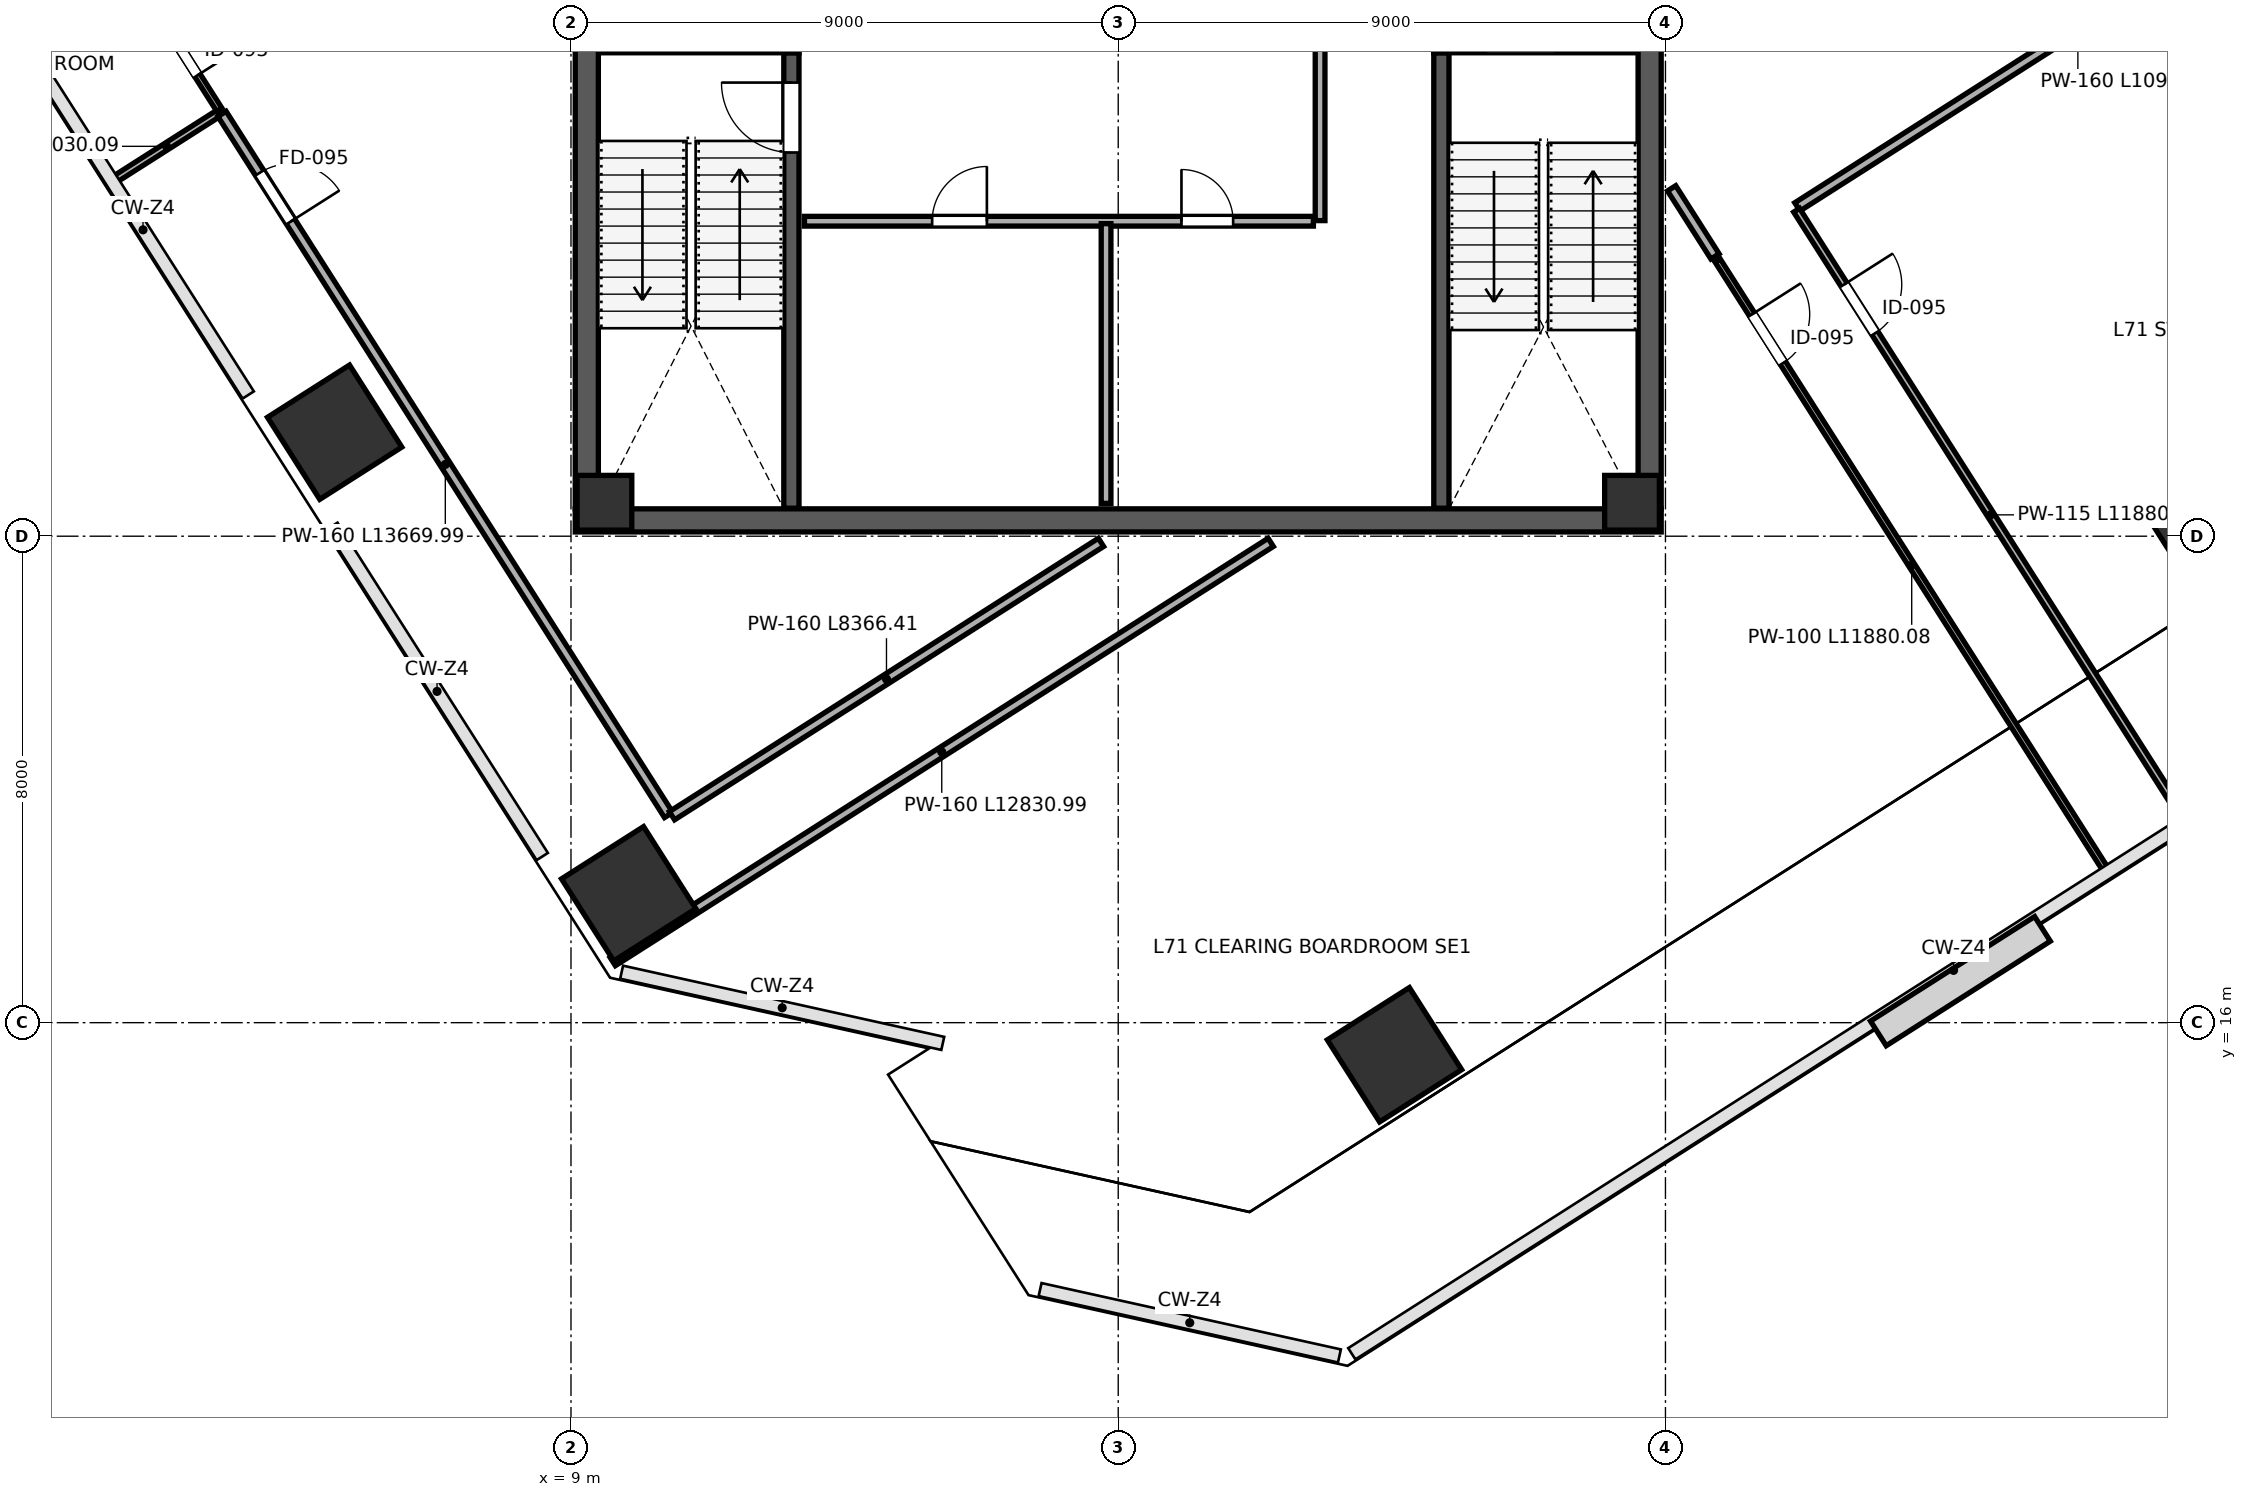
"""IFC4 building model, lengths in metres.
Left out: names, types, materials, properties, quantities, classifications, styles, units other than length and angle.
Written with IfcOpenShell. Run it as: python <this file> out.ifc"""

import sys

from ifc_helpers import new_model, si_unit, direction, frame, frame_2d, origin, origin_2d, place, context, subcontext, project, spatial, rectangle, extrude, source, transform, mapped, element, fill, save


model = new_model("IFC4")
c1 = context("Model", 3, precision=1e-05, world=origin(), true_north=direction((0.0, 1.0)))
c2 = subcontext(c1, "Body", "Model", "MODEL_VIEW")
j1 = project(units=[si_unit("LENGTHUNIT", "METRE"), si_unit("PLANEANGLEUNIT", "RADIAN")], contexts=[c1])
p1 = place(None, origin())
s1 = spatial("IfcSite", under=j1, at=p1, CompositionType="ELEMENT")
p2 = place(p1, origin())
s2 = spatial("IfcBuilding", under=s1, at=p2, CompositionType="ELEMENT")
p3 = place(p2, frame((0.0, 0.0, 315.6)))
s3 = spatial("IfcBuildingStorey", under=s2, at=p3, CompositionType="ELEMENT", Elevation=315.6)
m1 = source(origin(), c2, "Body", "SweptSolid", [
    extrude(rectangle(XDim=0.9, YDim=0.9, at=origin_2d()), origin(), (0.0, 0.0, 1.0), 4.198),
])
for number, where, z_axis, x_axis in (
    (1, (9.55, 24.55, 0.001), (0.0, 0.0, 1.0), (1.0, 0.0, 0.0)),
    (2, (26.45, 24.55, 0.001), (0.0, 0.0, 1.0), (1.0, 0.0, 0.0)),
):
    element("IfcColumn", number, at=place(p3, frame(where, z_axis=z_axis, x_axis=x_axis)), inside=s3, PredefinedType="COLUMN", context=c2, shape_type="MappedRepresentation", body=[
        mapped(m1, transform((0.0, 0.0, 0.0), scale=1.0)),
    ])
m2 = source(origin(), c2, "Body", "SweptSolid", [
    extrude(rectangle(XDim=1.6, YDim=1.6, at=origin_2d()), origin(), (0.0, 0.0, 1.0), 4.198),
])
for number, where, z_axis, x_axis in (
    (3, (5.113, 25.71, 0.001), (0.0, 0.0, 1.0), (-0.537, 0.843, 0.0)),
    (4, (9.949, 18.12, 0.001), (0.0, 0.0, 1.0), (-0.537, 0.843, 0.0)),
    (5, (22.544, 15.472, 0.001), (0.0, 0.0, 1.0), (-0.537, 0.843, 0.0)),
    (6, (36.038, 24.069, 0.001), (0.0, 0.0, 1.0), (-0.537, 0.843, 0.0)),
):
    element("IfcColumn", number, at=place(p3, frame(where, z_axis=z_axis, x_axis=x_axis)), inside=s3, PredefinedType="COLUMN", context=c2, shape_type="MappedRepresentation", body=[
        mapped(m2, transform((0.0, 0.0, 0.0), scale=1.0)),
    ])
p4 = place(p3, frame((9.26, 24.45, 0.0), z_axis=(0.0, 0.0, 1.0), x_axis=(0.0, 1.0, 0.0)))
e7 = element("IfcWall", 7, at=p4, inside=s3, PredefinedType="SHEAR", context=c2, shape_type="SweptSolid", body=[
    extrude(rectangle(XDim=15.1, YDim=0.38, at=frame_2d((7.55, 0.0))), origin(), (0.0, 0.0, 1.0), 3.96),
])
p5 = place(p4, frame((8.7, 0.0, 0.0)))
e8 = element("IfcOpeningElement", 8, at=p5, cuts=e7, PredefinedType="OPENING", context=c2, shape_type="SweptSolid", body=[
    extrude(rectangle(XDim=1.15, YDim=2.2, at=frame_2d((0.575, 1.1))), frame((0.0, 0.2, 0.0), z_axis=(0.0, -1.0, 0.0), x_axis=(1.0, 0.0, 0.0)), (0.0, 0.0, 1.0), 0.4),
])
p6 = place(p3, frame((26.74, 24.45, 0.0), z_axis=(0.0, 0.0, 1.0), x_axis=(0.0, 1.0, 0.0)))
e9 = element("IfcWall", 9, at=p6, inside=s3, PredefinedType="SHEAR", context=c2, shape_type="SweptSolid", body=[
    extrude(rectangle(XDim=15.1, YDim=0.38, at=frame_2d((7.55, 0.0))), origin(), (0.0, 0.0, 1.0), 3.96),
])
p7 = place(p6, frame((8.6, 0.0, 0.0)))
e10 = element("IfcOpeningElement", 10, at=p7, cuts=e9, PredefinedType="OPENING", context=c2, shape_type="SweptSolid", body=[
    extrude(rectangle(XDim=1.15, YDim=2.2, at=frame_2d((0.575, 1.1))), frame((0.0, 0.2, 0.0), z_axis=(0.0, -1.0, 0.0), x_axis=(1.0, 0.0, 0.0)), (0.0, 0.0, 1.0), 0.4),
])
p8 = place(p3, frame((9.07, 24.26, 0.0), z_axis=(0.0, 0.0, 1.0), x_axis=(1.0, 0.0, 0.0)))
e11 = element("IfcWall", 11, at=p8, inside=s3, PredefinedType="SHEAR", context=c2, shape_type="SweptSolid", body=[
    extrude(rectangle(XDim=17.86, YDim=0.38, at=frame_2d((8.93, 0.0))), origin(), (0.0, 0.0, 1.0), 3.96),
])
p9 = place(p3, frame((12.625, 24.46, 0.0), z_axis=(0.0, 0.0, 1.0), x_axis=(0.0, 1.0, 0.0)))
e12 = element("IfcWall", 12, at=p9, inside=s3, PredefinedType="SHEAR", context=c2, shape_type="SweptSolid", body=[
    extrude(rectangle(XDim=7.49, YDim=0.25, at=frame_2d((3.745, 0.0))), origin(), (0.0, 0.0, 1.0), 3.96),
])
p10 = place(p9, frame((5.85, 0.0, 0.0)))
e13 = element("IfcOpeningElement", 13, at=p10, cuts=e12, PredefinedType="OPENING", context=c2, shape_type="SweptSolid", body=[
    extrude(rectangle(XDim=1.15, YDim=2.2, at=frame_2d((0.575, 1.1))), frame((0.0, 0.135, 0.0), z_axis=(0.0, -1.0, 0.0), x_axis=(1.0, 0.0, 0.0)), (0.0, 0.0, 1.0), 0.27),
])
p11 = place(p3, frame((9.46, 32.075, 0.0), z_axis=(0.0, 0.0, 1.0), x_axis=(1.0, 0.0, 0.0)))
e14 = element("IfcWall", 14, at=p11, inside=s3, PredefinedType="SHEAR", context=c2, shape_type="SweptSolid", body=[
    extrude(rectangle(XDim=3.29, YDim=0.25, at=frame_2d((1.645, 0.0))), origin(), (0.0, 0.0, 1.0), 3.96),
])
p12 = place(p3, frame((23.315, 24.46, 0.0), z_axis=(0.0, 0.0, 1.0), x_axis=(0.0, 1.0, 0.0)))
e15 = element("IfcWall", 15, at=p12, inside=s3, PredefinedType="SHEAR", context=c2, shape_type="SweptSolid", body=[
    extrude(rectangle(XDim=7.49, YDim=0.25, at=frame_2d((3.745, 0.0))), origin(), (0.0, 0.0, 1.0), 3.96),
])
p13 = place(p3, frame((23.19, 32.075, 0.0), z_axis=(0.0, 0.0, 1.0), x_axis=(1.0, 0.0, 0.0)))
e16 = element("IfcWall", 16, at=p13, inside=s3, PredefinedType="SHEAR", context=c2, shape_type="SweptSolid", body=[
    extrude(rectangle(XDim=3.35, YDim=0.25, at=frame_2d((1.675, 0.0))), origin(), (0.0, 0.0, 1.0), 3.96),
])
p14 = place(p13, frame((0.85, 0.0, 0.0)))
e17 = element("IfcOpeningElement", 17, at=p14, cuts=e16, PredefinedType="OPENING", context=c2, shape_type="SweptSolid", body=[
    extrude(rectangle(XDim=1.15, YDim=2.2, at=frame_2d((0.575, 1.1))), frame((0.0, 0.135, 0.0), z_axis=(0.0, -1.0, 0.0), x_axis=(1.0, 0.0, 0.0)), (0.0, 0.0, 1.0), 0.27),
])
p15 = place(p3, frame((12.84, 29.18, 0.0), z_axis=(0.0, 0.0, 1.0), x_axis=(1.0, 0.0, 0.0)))
e18 = element("IfcWall", 18, at=p15, inside=s3, PredefinedType="PARTITIONING", context=c2, shape_type="SweptSolid", body=[
    extrude(rectangle(XDim=8.37, YDim=0.16, at=frame_2d((4.185, 0.0))), origin(), (0.0, 0.0, 1.0), 3.96),
])
p16 = place(p15, frame((2.1, 0.0, 0.0)))
e19 = element("IfcOpeningElement", 19, at=p16, cuts=e18, PredefinedType="OPENING", context=c2, shape_type="SweptSolid", body=[
    extrude(rectangle(XDim=0.9, YDim=2.15, at=frame_2d((0.45, 1.075))), frame((0.0, 0.09, 0.0), z_axis=(0.0, -1.0, 0.0), x_axis=(1.0, 0.0, 0.0)), (0.0, 0.0, 1.0), 0.18),
])
p17 = place(p15, frame((6.2, 0.0, 0.0)))
e20 = element("IfcOpeningElement", 20, at=p17, cuts=e18, PredefinedType="OPENING", context=c2, shape_type="SweptSolid", body=[
    extrude(rectangle(XDim=0.85, YDim=2.1, at=frame_2d((0.425, 1.05))), frame((0.0, 0.09, 0.0), z_axis=(0.0, -1.0, 0.0), x_axis=(1.0, 0.0, 0.0)), (0.0, 0.0, 1.0), 0.18),
])
p18 = place(p3, frame((17.8, 24.54, 0.0), z_axis=(0.0, 0.0, 1.0), x_axis=(0.0, 1.0, 0.0)))
e21 = element("IfcWall", 21, at=p18, inside=s3, PredefinedType="PARTITIONING", context=c2, shape_type="SweptSolid", body=[
    extrude(rectangle(XDim=4.6, YDim=0.16, at=frame_2d((2.3, 0.0))), origin(), (0.0, 0.0, 1.0), 3.96),
])
p19 = place(p3, frame((21.32, 29.19, 0.0), z_axis=(0.0, 0.0, 1.0), x_axis=(0.0, 1.0, 0.0)))
e22 = element("IfcWall", 22, at=p19, inside=s3, PredefinedType="PARTITIONING", context=c2, shape_type="SweptSolid", body=[
    extrude(rectangle(XDim=2.92, YDim=0.16, at=frame_2d((1.46, 0.0))), origin(), (0.0, 0.0, 1.0), 3.96),
])
p20 = place(p3, frame((1.493, 29.866, 0.0), z_axis=(0.0, 0.0, 1.0), x_axis=(0.843433611632, 0.537233415537, 0.0)))
e23 = element("IfcWall", 23, at=p20, inside=s3, PredefinedType="PARTITIONING", context=c2, shape_type="SweptSolid", body=[
    extrude(rectangle(XDim=2.03, YDim=0.115, at=frame_2d((1.015, 0.0))), origin(), (0.0, 0.0, 1.0), 3.295),
])
p21 = place(p3, frame((-0.502, 36.85, 0.0), z_axis=(0.0, 0.0, 1.0), x_axis=(0.537309039539, -0.843385437407, 0.0)))
e24 = element("IfcWall", 24, at=p21, inside=s3, PredefinedType="PARTITIONING", context=c2, shape_type="SweptSolid", body=[
    extrude(rectangle(XDim=6.922, YDim=0.1, at=frame_2d((3.461, 0.0))), origin(), (0.0, 0.0, 1.0), 3.96),
])
p22 = place(p21, frame((0.8, 0.0, 0.0)))
e25 = element("IfcOpeningElement", 25, at=p22, cuts=e24, PredefinedType="OPENING", context=c2, shape_type="SweptSolid", body=[
    extrude(rectangle(XDim=0.9, YDim=2.15, at=frame_2d((0.45, 1.075))), frame((0.0, 0.06, 0.0), z_axis=(0.0, -1.0, 0.0), x_axis=(1.0, 0.0, 0.0)), (0.0, 0.0, 1.0), 0.12),
])
p23 = place(p21, frame((5.3, 0.0, 0.0)))
e26 = element("IfcOpeningElement", 26, at=p23, cuts=e24, PredefinedType="OPENING", context=c2, shape_type="SweptSolid", body=[
    extrude(rectangle(XDim=0.95, YDim=2.15, at=frame_2d((0.475, 1.075))), frame((0.0, 0.06, 0.0), z_axis=(0.0, -1.0, 0.0), x_axis=(1.0, 0.0, 0.0)), (0.0, 0.0, 1.0), 0.12),
])
p24 = place(p3, frame((3.26, 30.945, 0.0), z_axis=(0.0, 0.0, 1.0), x_axis=(0.537307625317, -0.843386338386, 0.0)))
e27 = element("IfcWall", 27, at=p24, inside=s3, PredefinedType="PARTITIONING", context=c2, shape_type="SweptSolid", body=[
    extrude(rectangle(XDim=13.67, YDim=0.16, at=frame_2d((6.835, 0.0))), origin(), (0.0, 0.0, 1.0), 3.96),
])
p25 = place(p24, frame((1.15, 0.0, 0.0)))
e28 = element("IfcOpeningElement", 28, at=p25, cuts=e27, PredefinedType="OPENING", context=c2, shape_type="SweptSolid", body=[
    extrude(rectangle(XDim=0.95, YDim=2.15, at=frame_2d((0.475, 1.075))), frame((0.0, 0.09, 0.0), z_axis=(0.0, -1.0, 0.0), x_axis=(1.0, 0.0, 0.0)), (0.0, 0.0, 1.0), 0.18),
])
p26 = place(p3, frame((10.661, 19.403, 0.0), z_axis=(0.0, 0.0, 1.0), x_axis=(0.843399441764, 0.537287057012, 0.0)))
e29 = element("IfcWall", 29, at=p26, inside=s3, PredefinedType="PARTITIONING", context=c2, shape_type="SweptSolid", body=[
    extrude(rectangle(XDim=8.366, YDim=0.16, at=frame_2d((4.183, 0.0))), origin(), (0.0, 0.0, 1.0), 3.96),
])
p27 = place(p3, frame((27.102, 29.721, 0.0), z_axis=(0.0, 0.0, 1.0), x_axis=(0.537279676557, -0.843404143432, 0.0)))
e30 = element("IfcWall", 30, at=p27, inside=s3, PredefinedType="PARTITIONING", context=c2, shape_type="SweptSolid", body=[
    extrude(rectangle(XDim=1.329, YDim=0.16, at=frame_2d((0.664, 0.0))), origin(), (0.0, 0.0, 1.0), 3.96),
])
p28 = place(p3, frame((29.169, 29.416, 0.0), z_axis=(0.0, 0.0, 1.0), x_axis=(0.843389386546, 0.537302840734, 0.0)))
e31 = element("IfcWall", 31, at=p28, inside=s3, PredefinedType="PARTITIONING", context=c2, shape_type="SweptSolid", body=[
    extrude(rectangle(XDim=10.94, YDim=0.16, at=frame_2d((5.47, 0.0))), origin(), (0.0, 0.0, 1.0), 3.96),
])
p29 = place(p3, frame((9.687, 17.004, 0.0), z_axis=(0.0, 0.0, 1.0), x_axis=(0.843392646996, 0.537297722862, 0.0)))
e32 = element("IfcWall", 32, at=p29, inside=s3, PredefinedType="PARTITIONING", context=c2, shape_type="SweptSolid", body=[
    extrude(rectangle(XDim=12.831, YDim=0.16, at=frame_2d((6.416, 0.0))), origin(), (0.0, 0.0, 1.0), 3.96),
])
p30 = place(p3, frame((29.157, 29.361, 0.0), z_axis=(0.0, 0.0, 1.0), x_axis=(0.537294294715, -0.843394830946, 0.0)))
e33 = element("IfcWall", 33, at=p30, inside=s3, PredefinedType="PARTITIONING", context=c2, shape_type="SweptSolid", body=[
    extrude(rectangle(XDim=11.88, YDim=0.115, at=frame_2d((5.94, 0.0))), origin(), (0.0, 0.0, 1.0), 3.96),
])
p31 = place(p30, frame((1.45, 0.0, 0.0)))
e34 = element("IfcOpeningElement", 34, at=p31, cuts=e33, PredefinedType="OPENING", context=c2, shape_type="SweptSolid", body=[
    extrude(rectangle(XDim=0.95, YDim=2.15, at=frame_2d((0.475, 1.075))), frame((0.0, 0.067, 0.0), z_axis=(0.0, -1.0, 0.0), x_axis=(1.0, 0.0, 0.0)), (0.0, 0.0, 1.0), 0.135),
])
p32 = place(p3, frame((27.858, 28.533, 0.0), z_axis=(0.0, 0.0, 1.0), x_axis=(0.537294294715, -0.843394830946, 0.0)))
e35 = element("IfcWall", 35, at=p32, inside=s3, PredefinedType="PARTITIONING", context=c2, shape_type="SweptSolid", body=[
    extrude(rectangle(XDim=11.88, YDim=0.1, at=frame_2d((5.94, 0.0))), origin(), (0.0, 0.0, 1.0), 3.96),
])
p33 = place(p32, frame((1.05, 0.0, 0.0)))
e36 = element("IfcOpeningElement", 36, at=p33, cuts=e35, PredefinedType="OPENING", context=c2, shape_type="SweptSolid", body=[
    extrude(rectangle(XDim=0.95, YDim=2.15, at=frame_2d((0.475, 1.075))), frame((0.0, 0.06, 0.0), z_axis=(0.0, -1.0, 0.0), x_axis=(1.0, 0.0, 0.0)), (0.0, 0.0, 1.0), 0.12),
])
m3 = source(origin(), c2, "Body", "SweptSolid", [
    extrude(rectangle(XDim=1.15, YDim=2.2, at=frame_2d((0.575, 1.1))), frame((0.0, 0.025, 0.0), z_axis=(0.0, -1.0, 0.0), x_axis=(1.0, 0.0, 0.0)), (0.0, 0.0, 1.0), 0.05),
])
p34 = place(p10, origin())
e37 = element("IfcDoor", 37, at=p34, inside=s3, OperationType="SINGLE_SWING_RIGHT", PredefinedType="DOOR", context=c2, shape_type="MappedRepresentation", body=[
    mapped(m3, transform((0.0, 0.0, 0.0), scale=1.0)),
])
fill(e13, e37)
m4 = source(origin(), c2, "Body", "SweptSolid", [
    extrude(rectangle(XDim=0.9, YDim=2.15, at=frame_2d((0.45, 1.075))), frame((0.0, 0.025, 0.0), z_axis=(0.0, -1.0, 0.0), x_axis=(1.0, 0.0, 0.0)), (0.0, 0.0, 1.0), 0.05),
])
p35 = place(p16, origin())
e38 = element("IfcDoor", 38, at=p35, inside=s3, OperationType="SINGLE_SWING_RIGHT", PredefinedType="DOOR", context=c2, shape_type="MappedRepresentation", body=[
    mapped(m4, transform((0.0, 0.0, 0.0), scale=1.0)),
])
fill(e19, e38)
m5 = source(origin(), c2, "Body", "SweptSolid", [
    extrude(rectangle(XDim=0.85, YDim=2.1, at=frame_2d((0.425, 1.05))), frame((0.0, 0.025, 0.0), z_axis=(0.0, -1.0, 0.0), x_axis=(1.0, 0.0, 0.0)), (0.0, 0.0, 1.0), 0.05),
])
p36 = place(p17, origin())
e39 = element("IfcDoor", 39, at=p36, inside=s3, OperationType="SINGLE_SWING_LEFT", PredefinedType="DOOR", context=c2, shape_type="MappedRepresentation", body=[
    mapped(m5, transform((0.0, 0.0, 0.0), scale=1.0)),
])
fill(e20, e39)
m6 = source(origin(), c2, "Body", "SweptSolid", [
    extrude(rectangle(XDim=0.95, YDim=2.15, at=frame_2d((0.475, 1.075))), frame((0.0, 0.025, 0.0), z_axis=(0.0, -1.0, 0.0), x_axis=(1.0, 0.0, 0.0)), (0.0, 0.0, 1.0), 0.05),
])
p37 = place(p23, origin())
e40 = element("IfcDoor", 40, at=p37, inside=s3, OperationType="SINGLE_SWING_RIGHT", PredefinedType="DOOR", context=c2, shape_type="MappedRepresentation", body=[
    mapped(m6, transform((0.0, 0.0, 0.0), scale=1.0)),
])
fill(e26, e40)
m7 = source(origin(), c2, "Body", "SweptSolid", [
    extrude(rectangle(XDim=0.95, YDim=2.15, at=frame_2d((0.475, 1.075))), frame((0.0, 0.025, 0.0), z_axis=(0.0, -1.0, 0.0), x_axis=(1.0, 0.0, 0.0)), (0.0, 0.0, 1.0), 0.05),
])
p38 = place(p25, origin())
e41 = element("IfcDoor", 41, at=p38, inside=s3, OperationType="SINGLE_SWING_RIGHT", PredefinedType="DOOR", context=c2, shape_type="MappedRepresentation", body=[
    mapped(m7, transform((0.0, 0.0, 0.0), scale=1.0)),
])
fill(e28, e41)
p39 = place(p31, origin())
e42 = element("IfcDoor", 42, at=p39, inside=s3, OperationType="SINGLE_SWING_LEFT", PredefinedType="DOOR", context=c2, shape_type="MappedRepresentation", body=[
    mapped(m6, transform((0.0, 0.0, 0.0), scale=1.0)),
])
fill(e34, e42)
p40 = place(p33, origin())
e43 = element("IfcDoor", 43, at=p40, inside=s3, OperationType="SINGLE_SWING_LEFT", PredefinedType="DOOR", context=c2, shape_type="MappedRepresentation", body=[
    mapped(m6, transform((0.0, 0.0, 0.0), scale=1.0)),
])
fill(e36, e43)
save(model, sys.argv[1])
